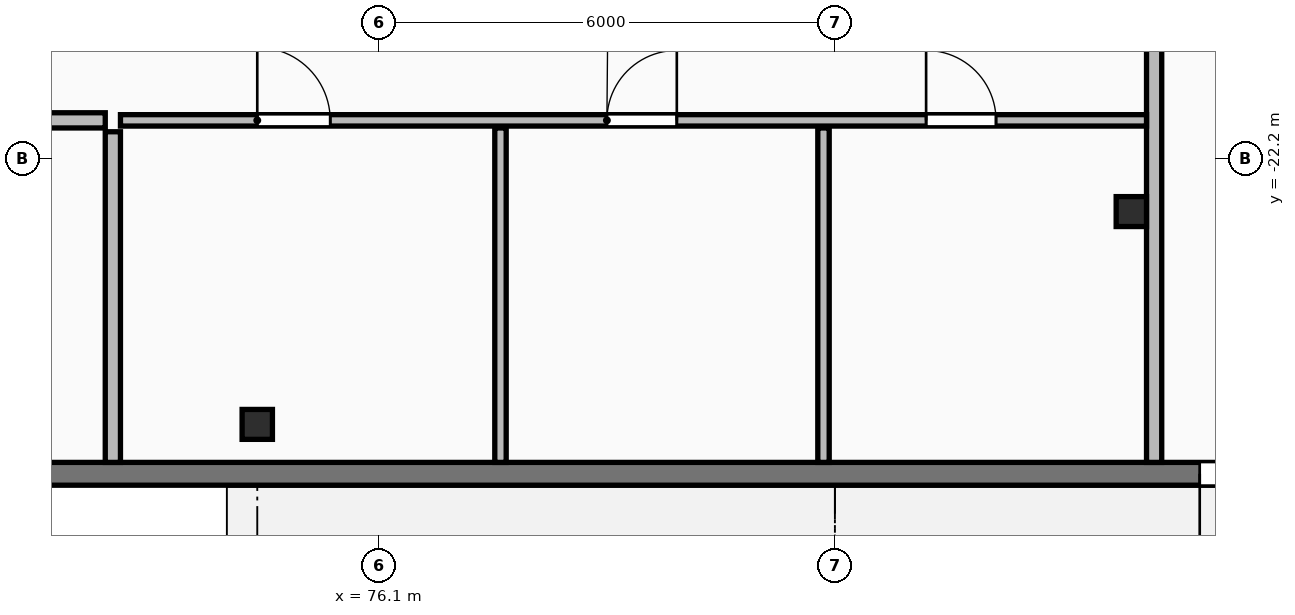
"""IFC4 building model, lengths in metres.
Left out: names, types, materials, properties, quantities, classifications, styles, units other than length and angle.
Written with IfcOpenShell. Run it as: python <this file> out.ifc"""

import sys

from ifc_helpers import new_model, si_unit, direction, frame, frame_2d, origin, origin_2d, place, context, subcontext, project, spatial, rectangle, i_section, extrude, element, fill, save


model = new_model("IFC4")
c1 = context("Model", 3, precision=1e-05, world=origin(), true_north=direction((0.0, 1.0)))
c2 = subcontext(c1, "Body", "Model", "MODEL_VIEW")
j1 = project(units=[si_unit("LENGTHUNIT", "METRE"), si_unit("PLANEANGLEUNIT", "RADIAN")], contexts=[c1])
p1 = place(None, origin())
s1 = spatial("IfcSite", under=j1, at=p1, CompositionType="ELEMENT")
p2 = place(p1, origin())
s2 = spatial("IfcBuilding", under=s1, at=p2, CompositionType="ELEMENT")
p3 = place(p2, origin())
s3 = spatial("IfcBuildingStorey", under=s2, at=p3, CompositionType="ELEMENT", Elevation=0.0)
for number, where, z_axis, x_axis in (
    (1, (86.0, -22.9, 0.0), (0.0, 0.0, 1.0), (1.0, 0.0, 0.0)),
    (2, (74.5, -25.7, 0.0), (0.0, 0.0, 1.0), (1.0, 0.0, 0.0)),
):
    element("IfcColumn", number, at=place(p3, frame(where, z_axis=z_axis, x_axis=x_axis)), inside=s3, PredefinedType="COLUMN", context=c2, shape_type="SweptSolid", body=[
        extrude(i_section(OverallWidth=0.399, OverallDepth=0.394, WebThickness=0.023, FlangeThickness=0.037, FilletRadius=0.015, at=origin_2d()), origin(), (0.0, 0.0, 1.0), 5.4),
    ])
p4 = place(p3, frame((43.5, -26.35, 0.0), z_axis=(0.0, 0.0, 1.0), x_axis=(1.0, 0.0, 0.0)))
e3 = element("IfcWall", 3, at=p4, inside=s3, PredefinedType="STANDARD", context=c2, shape_type="SweptSolid", body=[
    extrude(rectangle(XDim=46.0, YDim=0.3, at=frame_2d((23.0, 0.0))), origin(), (0.0, 0.0, 1.0), 5.1),
])
p5 = place(p4, frame((9.5, 0.0, 0.0)))
e4 = element("IfcOpeningElement", 4, at=p5, cuts=e3, PredefinedType="OPENING", context=c2, shape_type="SweptSolid", body=[
    extrude(rectangle(XDim=2.0, YDim=2.6, at=frame_2d((1.0, 1.3))), frame((0.0, 0.16, 0.0), z_axis=(0.0, -1.0, 0.0), x_axis=(1.0, 0.0, 0.0)), (0.0, 0.0, 1.0), 0.32),
])
p6 = place(p4, frame((24.7, 0.0, 0.0)))
e5 = element("IfcOpeningElement", 5, at=p6, cuts=e3, PredefinedType="OPENING", context=c2, shape_type="SweptSolid", body=[
    extrude(rectangle(XDim=1.8, YDim=2.2, at=frame_2d((0.9, 1.1))), frame((0.0, 0.16, 0.0), z_axis=(0.0, -1.0, 0.0), x_axis=(1.0, 0.0, 0.0)), (0.0, 0.0, 1.0), 0.32),
])
p7 = place(p4, frame((43.4, 0.0, 0.0)))
e6 = element("IfcOpeningElement", 6, at=p7, cuts=e3, PredefinedType="OPENING", context=c2, shape_type="SweptSolid", body=[
    extrude(rectangle(XDim=1.8, YDim=2.2, at=frame_2d((0.9, 1.1))), frame((0.0, 0.16, 0.0), z_axis=(0.0, -1.0, 0.0), x_axis=(1.0, 0.0, 0.0)), (0.0, 0.0, 1.0), 0.32),
])
p8 = place(p3, frame((65.9, -21.7, 0.0), z_axis=(0.0, 0.0, 1.0), x_axis=(1.0, 0.0, 0.0)))
e7 = element("IfcWall", 7, at=p8, inside=s3, PredefinedType="PARTITIONING", context=c2, shape_type="SweptSolid", body=[
    extrude(rectangle(XDim=6.6, YDim=0.2, at=frame_2d((3.3, 0.0))), origin(), (0.0, 0.0, 1.0), 5.1),
])
p9 = place(p8, frame((2.4, 0.0, 0.0)))
e8 = element("IfcOpeningElement", 8, at=p9, cuts=e7, PredefinedType="OPENING", context=c2, shape_type="SweptSolid", body=[
    extrude(rectangle(XDim=1.0, YDim=2.1, at=frame_2d((0.5, 1.05))), frame((0.0, 0.11, 0.0), z_axis=(0.0, -1.0, 0.0), x_axis=(1.0, 0.0, 0.0)), (0.0, 0.0, 1.0), 0.22),
])
p10 = place(p3, frame((72.6, -26.2, 0.0), z_axis=(0.0, 0.0, 1.0), x_axis=(0.0, 1.0, 0.0)))
e9 = element("IfcWall", 9, at=p10, inside=s3, PredefinedType="PARTITIONING", context=c2, shape_type="SweptSolid", body=[
    extrude(rectangle(XDim=4.35, YDim=0.2, at=frame_2d((2.175, 0.0))), origin(), (0.0, 0.0, 1.0), 5.1),
])
p11 = place(p3, frame((86.3, -26.2, 0.0), z_axis=(0.0, 0.0, 1.0), x_axis=(0.0, 1.0, 0.0)))
e10 = element("IfcWall", 10, at=p11, inside=s3, PredefinedType="PARTITIONING", context=c2, shape_type="SweptSolid", body=[
    extrude(rectangle(XDim=44.35, YDim=0.2, at=frame_2d((22.175, 0.0))), origin(), (0.0, 0.0, 1.0), 5.1),
])
p12 = place(p11, frame((16.0, 0.0, 0.0)))
e11 = element("IfcOpeningElement", 11, at=p12, cuts=e10, PredefinedType="OPENING", context=c2, shape_type="SweptSolid", body=[
    extrude(rectangle(XDim=1.1, YDim=2.1, at=frame_2d((0.55, 1.05))), frame((0.0, 0.11, 0.0), z_axis=(0.0, -1.0, 0.0), x_axis=(1.0, 0.0, 0.0)), (0.0, 0.0, 1.0), 0.22),
])
p13 = place(p3, frame((72.7, -21.7, 0.0), z_axis=(0.0, 0.0, 1.0), x_axis=(1.0, 0.0, 0.0)))
e12 = element("IfcWall", 12, at=p13, inside=s3, PredefinedType="PARTITIONING", context=c2, shape_type="SweptSolid", body=[
    extrude(rectangle(XDim=13.5, YDim=0.15, at=frame_2d((6.75, 0.0))), origin(), (0.0, 0.0, 1.0), 5.1),
])
p14 = place(p13, frame((1.8, 0.0, 0.0)))
e13 = element("IfcOpeningElement", 13, at=p14, cuts=e12, PredefinedType="OPENING", context=c2, shape_type="SweptSolid", body=[
    extrude(rectangle(XDim=0.96, YDim=2.1, at=frame_2d((0.48, 1.05))), frame((0.0, 0.085, 0.0), z_axis=(0.0, -1.0, 0.0), x_axis=(1.0, 0.0, 0.0)), (0.0, 0.0, 1.0), 0.17),
])
p15 = place(p13, frame((6.4, 0.0, 0.0)))
e14 = element("IfcOpeningElement", 14, at=p15, cuts=e12, PredefinedType="OPENING", context=c2, shape_type="SweptSolid", body=[
    extrude(rectangle(XDim=0.92, YDim=2.08, at=frame_2d((0.46, 1.04))), frame((0.0, 0.085, 0.0), z_axis=(0.0, -1.0, 0.0), x_axis=(1.0, 0.0, 0.0)), (0.0, 0.0, 1.0), 0.17),
])
p16 = place(p13, frame((10.6, 0.0, 0.0)))
e15 = element("IfcOpeningElement", 15, at=p16, cuts=e12, PredefinedType="OPENING", context=c2, shape_type="SweptSolid", body=[
    extrude(rectangle(XDim=0.92, YDim=2.08, at=frame_2d((0.46, 1.04))), frame((0.0, 0.085, 0.0), z_axis=(0.0, -1.0, 0.0), x_axis=(1.0, 0.0, 0.0)), (0.0, 0.0, 1.0), 0.17),
])
for number, where, z_axis, x_axis in (
    (16, (77.7, -26.2, 0.0), (0.0, 0.0, 1.0), (0.0, 1.0, 0.0)),
    (17, (81.95, -26.2, 0.0), (0.0, 0.0, 1.0), (0.0, 1.0, 0.0)),
):
    element("IfcWall", number, at=place(p3, frame(where, z_axis=z_axis, x_axis=x_axis)), inside=s3, PredefinedType="PARTITIONING", context=c2, shape_type="SweptSolid", body=[
        extrude(rectangle(XDim=4.4, YDim=0.15, at=frame_2d((2.2, 0.0))), origin(), (0.0, 0.0, 1.0), 5.1),
    ])
p17 = place(p7, frame((1.8, 0.0, 0.0), z_axis=(0.0, 0.0, 1.0), x_axis=(-1.0, 0.0, 0.0)))
e18 = element("IfcDoor", 18, at=p17, inside=s3, OperationType="DOUBLE_DOOR_SINGLE_SWING", PredefinedType="DOOR", context=c2, shape_type="SweptSolid", body=[
    extrude(rectangle(XDim=1.8, YDim=2.2, at=frame_2d((0.9, 1.1))), frame((0.0, 0.025, 0.0), z_axis=(0.0, -1.0, 0.0), x_axis=(1.0, 0.0, 0.0)), (0.0, 0.0, 1.0), 0.05),
])
fill(e6, e18)
p18 = place(p14, origin())
e19 = element("IfcDoor", 19, at=p18, inside=s3, OperationType="SINGLE_SWING_LEFT", PredefinedType="DOOR", context=c2, shape_type="SweptSolid", body=[
    extrude(rectangle(XDim=0.96, YDim=2.1, at=frame_2d((0.48, 1.05))), frame((0.0, 0.025, 0.0), z_axis=(0.0, -1.0, 0.0), x_axis=(1.0, 0.0, 0.0)), (0.0, 0.0, 1.0), 0.05),
])
fill(e13, e19)
p19 = place(p15, origin())
e20 = element("IfcDoor", 20, at=p19, inside=s3, OperationType="SINGLE_SWING_RIGHT", PredefinedType="DOOR", context=c2, shape_type="SweptSolid", body=[
    extrude(rectangle(XDim=0.92, YDim=2.08, at=frame_2d((0.46, 1.04))), frame((0.0, 0.025, 0.0), z_axis=(0.0, -1.0, 0.0), x_axis=(1.0, 0.0, 0.0)), (0.0, 0.0, 1.0), 0.05),
])
fill(e14, e20)
p20 = place(p16, origin())
e21 = element("IfcDoor", 21, at=p20, inside=s3, OperationType="SINGLE_SWING_LEFT", PredefinedType="DOOR", context=c2, shape_type="SweptSolid", body=[
    extrude(rectangle(XDim=0.92, YDim=2.08, at=frame_2d((0.46, 1.04))), frame((0.0, 0.025, 0.0), z_axis=(0.0, -1.0, 0.0), x_axis=(1.0, 0.0, 0.0)), (0.0, 0.0, 1.0), 0.05),
])
fill(e15, e21)
save(model, sys.argv[1])
